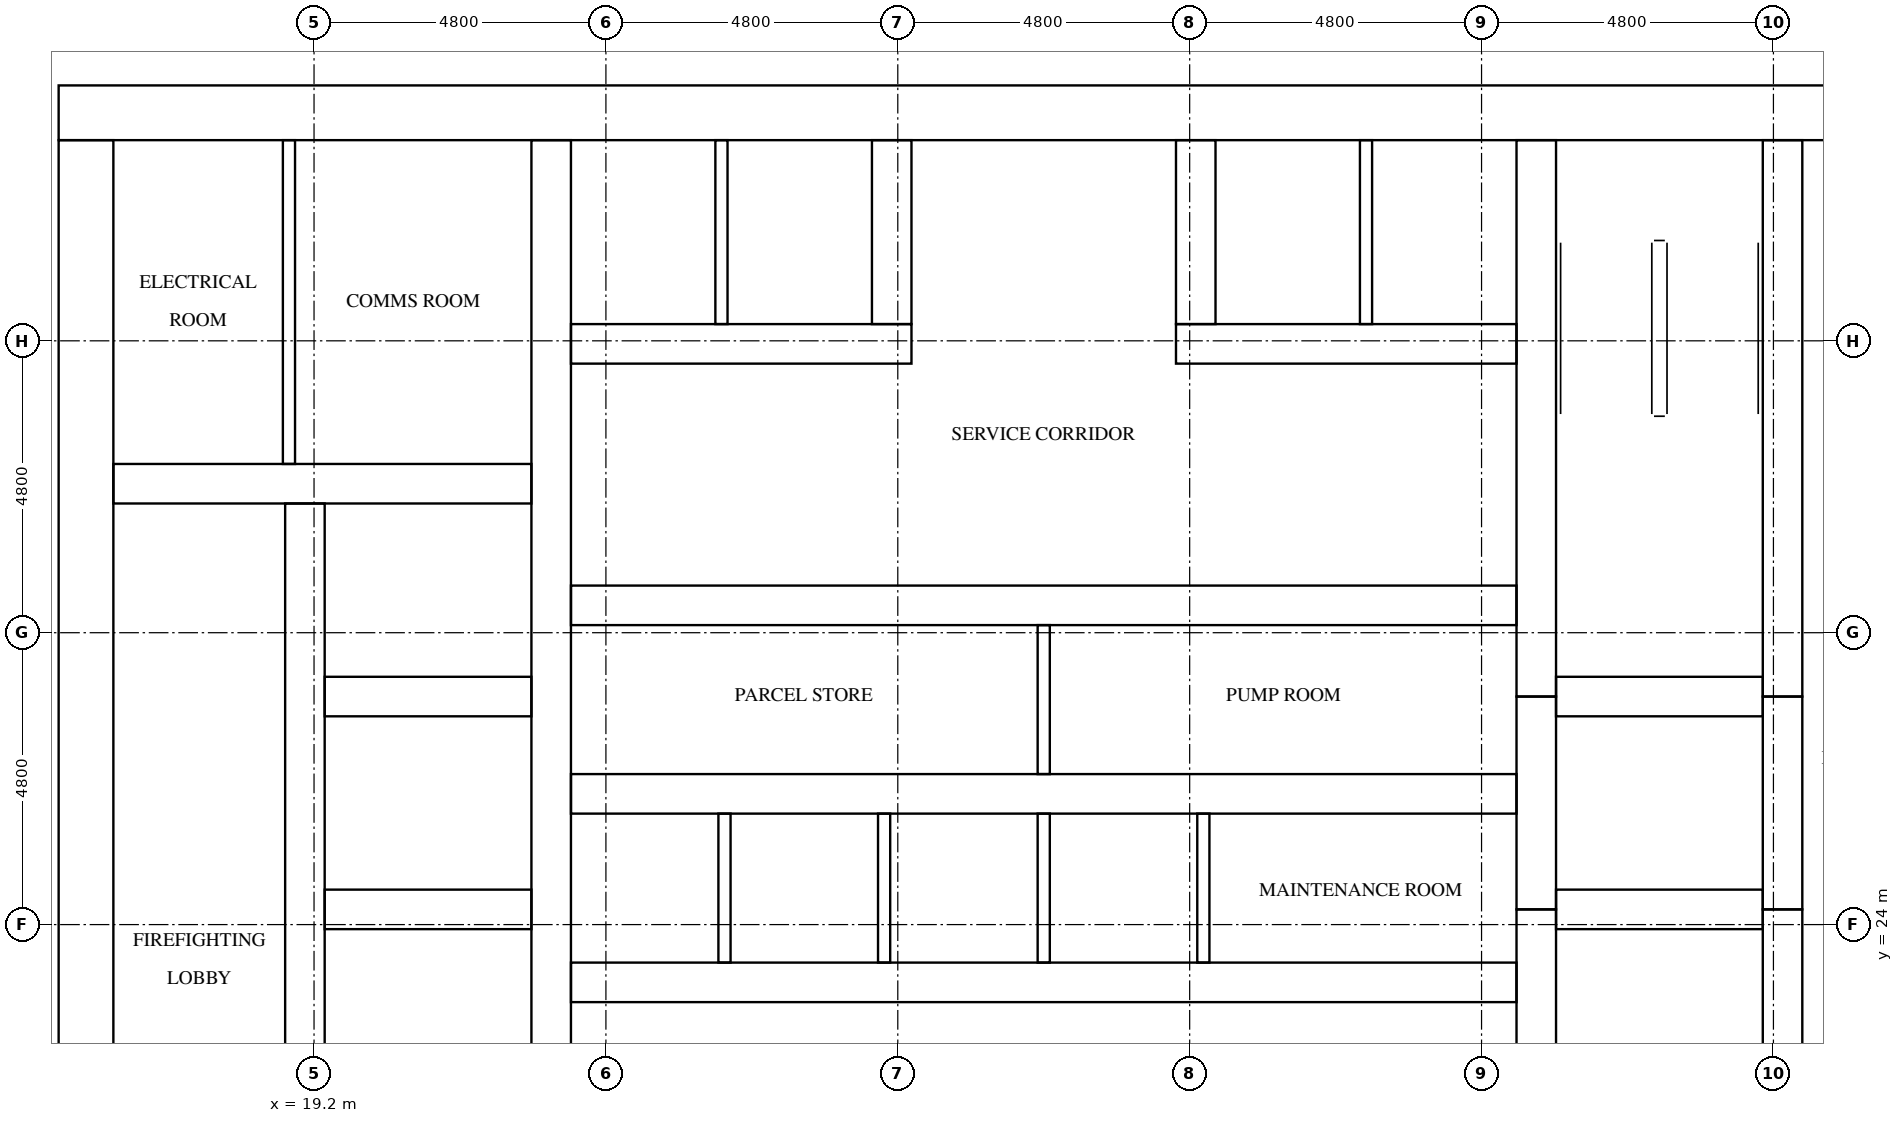
"""IFC4 building model, lengths in metres.
Left out: names, types, materials, properties, quantities, classifications, styles, units other than length and angle.
Written with IfcOpenShell. Run it as: python <this file> out.ifc"""

import sys

from ifc_helpers import new_model, si_unit, direction, frame, frame_2d, origin, place, context, subcontext, project, spatial, rectangle, extrude, element, fill, save


model = new_model("IFC4")
c1 = context("Model", 3, precision=1e-05, world=origin(), true_north=direction((0.0, 1.0)))
c2 = subcontext(c1, "Body", "Model", "MODEL_VIEW")
j1 = project(units=[si_unit("LENGTHUNIT", "METRE"), si_unit("PLANEANGLEUNIT", "RADIAN")], contexts=[c1])
p1 = place(None, origin())
s1 = spatial("IfcSite", under=j1, at=p1, CompositionType="ELEMENT")
p2 = place(p1, origin())
s2 = spatial("IfcBuilding", under=s1, at=p2, CompositionType="ELEMENT")
p3 = place(p2, frame((0.0, 0.0, 73.3)))
s3 = spatial("IfcBuildingStorey", under=s2, at=p3, CompositionType="ELEMENT", Elevation=73.3)
p4 = place(p3, frame((15.0, 37.35, 0.0), z_axis=(0.0, 0.0, 1.0), x_axis=(1.0, 0.0, 0.0)))
e1 = element("IfcWall", 1, at=p4, inside=s3, PredefinedType="SHEAR", context=c2, shape_type="SweptSolid", body=[
    extrude(rectangle(XDim=32.4, YDim=0.9, at=frame_2d((16.2, 0.0))), origin(), (0.0, 0.0, 1.0), 3.2),
])
p5 = place(p4, frame((15.3, 0.0, 0.0)))
e2 = element("IfcOpeningElement", 2, at=p5, cuts=e1, PredefinedType="OPENING", context=c2, shape_type="SweptSolid", body=[
    extrude(rectangle(XDim=1.8, YDim=2.1, at=frame_2d((0.9, 1.05))), frame((0.0, 0.46, 0.0), z_axis=(0.0, -1.0, 0.0), x_axis=(1.0, 0.0, 0.0)), (0.0, 0.0, 1.0), 0.92),
])
p6 = place(p4, frame((1.794, 0.0, 0.0)))
e3 = element("IfcOpeningElement", 3, at=p6, cuts=e1, PredefinedType="OPENING", context=c2, shape_type="SweptSolid", body=[
    extrude(rectangle(XDim=1.0, YDim=2.1, at=frame_2d((0.5, 1.05))), frame((0.0, 0.46, 0.0), z_axis=(0.0, -1.0, 0.0), x_axis=(1.0, 0.0, 0.0)), (0.0, 0.0, 1.0), 0.92),
])
p7 = place(p4, frame((5.331, 0.0, 0.0)))
e4 = element("IfcOpeningElement", 4, at=p7, cuts=e1, PredefinedType="OPENING", context=c2, shape_type="SweptSolid", body=[
    extrude(rectangle(XDim=1.0, YDim=2.1, at=frame_2d((0.5, 1.05))), frame((0.0, 0.46, 0.0), z_axis=(0.0, -1.0, 0.0), x_axis=(1.0, 0.0, 0.0)), (0.0, 0.0, 1.0), 0.92),
])
p8 = place(p3, frame((15.45, 15.9, 0.0), z_axis=(0.0, 0.0, 1.0), x_axis=(0.0, 1.0, 0.0)))
e5 = element("IfcWall", 5, at=p8, inside=s3, PredefinedType="SHEAR", context=c2, shape_type="SweptSolid", body=[
    extrude(rectangle(XDim=21.0, YDim=0.9, at=frame_2d((10.5, 0.0))), origin(), (0.0, 0.0, 1.0), 3.2),
])
p9 = place(p8, frame((4.86, 0.0, 0.0)))
e6 = element("IfcOpeningElement", 6, at=p9, cuts=e5, PredefinedType="OPENING", context=c2, shape_type="SweptSolid", body=[
    extrude(rectangle(XDim=1.2, YDim=2.1, at=frame_2d((0.6, 1.05))), frame((0.0, 0.46, 0.0), z_axis=(0.0, -1.0, 0.0), x_axis=(1.0, 0.0, 0.0)), (0.0, 0.0, 1.0), 0.92),
])
p10 = place(p3, frame((19.05, 15.9, 0.0), z_axis=(0.0, 0.0, 1.0), x_axis=(0.0, 1.0, 0.0)))
e7 = element("IfcWall", 7, at=p10, inside=s3, PredefinedType="SHEAR", context=c2, shape_type="SweptSolid", body=[
    extrude(rectangle(XDim=15.025, YDim=0.65, at=frame_2d((7.513, 0.0))), origin(), (0.0, 0.0, 1.0), 3.2),
])
p11 = place(p10, frame((9.55, 0.0, 0.0)))
e8 = element("IfcOpeningElement", 8, at=p11, cuts=e7, PredefinedType="OPENING", context=c2, shape_type="SweptSolid", body=[
    extrude(rectangle(XDim=1.1, YDim=2.1, at=frame_2d((0.55, 1.05))), frame((0.0, 0.335, 0.0), z_axis=(0.0, -1.0, 0.0), x_axis=(1.0, 0.0, 0.0)), (0.0, 0.0, 1.0), 0.67),
])
p12 = place(p10, frame((13.05, 0.0, 0.0)))
e9 = element("IfcOpeningElement", 9, at=p12, cuts=e7, PredefinedType="OPENING", context=c2, shape_type="SweptSolid", body=[
    extrude(rectangle(XDim=1.1, YDim=2.1, at=frame_2d((0.55, 1.05))), frame((0.0, 0.335, 0.0), z_axis=(0.0, -1.0, 0.0), x_axis=(1.0, 0.0, 0.0)), (0.0, 0.0, 1.0), 0.67),
])
p13 = place(p10, frame((0.3, 0.0, 0.0)))
e10 = element("IfcOpeningElement", 10, at=p13, cuts=e7, PredefinedType="OPENING", context=c2, shape_type="SweptSolid", body=[
    extrude(rectangle(XDim=1.2, YDim=2.1, at=frame_2d((0.6, 1.05))), frame((0.0, 0.335, 0.0), z_axis=(0.0, -1.0, 0.0), x_axis=(1.0, 0.0, 0.0)), (0.0, 0.0, 1.0), 0.67),
])
p14 = place(p3, frame((23.1, 15.9, 0.0), z_axis=(0.0, 0.0, 1.0), x_axis=(0.0, 1.0, 0.0)))
e11 = element("IfcWall", 11, at=p14, inside=s3, PredefinedType="SHEAR", context=c2, shape_type="SweptSolid", body=[
    extrude(rectangle(XDim=21.0, YDim=0.65, at=frame_2d((10.5, 0.0))), origin(), (0.0, 0.0, 1.0), 3.2),
])
p15 = place(p3, frame((39.3, 15.9, 0.0), z_axis=(0.0, 0.0, 1.0), x_axis=(0.0, 1.0, 0.0)))
e12 = element("IfcWall", 12, at=p15, inside=s3, PredefinedType="SHEAR", context=c2, shape_type="SweptSolid", body=[
    extrude(rectangle(XDim=8.35, YDim=0.65, at=frame_2d((4.175, 0.0))), origin(), (0.0, 0.0, 1.0), 3.2),
])
p16 = place(p3, frame((39.3, 24.25, 0.0), z_axis=(0.0, 0.0, 1.0), x_axis=(0.0, 1.0, 0.0)))
e13 = element("IfcWall", 13, at=p16, inside=s3, PredefinedType="SHEAR", context=c2, shape_type="SweptSolid", body=[
    extrude(rectangle(XDim=3.5, YDim=0.65, at=frame_2d((1.75, 0.0))), origin(), (0.0, 0.0, 1.0), 3.2),
])
p17 = place(p3, frame((39.3, 27.75, 0.0), z_axis=(0.0, 0.0, 1.0), x_axis=(0.0, 1.0, 0.0)))
e14 = element("IfcWall", 14, at=p17, inside=s3, PredefinedType="SHEAR", context=c2, shape_type="SweptSolid", body=[
    extrude(rectangle(XDim=9.15, YDim=0.65, at=frame_2d((4.575, 0.0))), origin(), (0.0, 0.0, 1.0), 3.2),
])
p18 = place(p3, frame((43.35, 15.9, 0.0), z_axis=(0.0, 0.0, 1.0), x_axis=(0.0, 1.0, 0.0)))
e15 = element("IfcWall", 15, at=p18, inside=s3, PredefinedType="SHEAR", context=c2, shape_type="SweptSolid", body=[
    extrude(rectangle(XDim=8.35, YDim=0.65, at=frame_2d((4.175, 0.0))), origin(), (0.0, 0.0, 1.0), 3.2),
])
p19 = place(p18, frame((0.3, 0.0, 0.0)))
e16 = element("IfcOpeningElement", 16, at=p19, cuts=e15, PredefinedType="OPENING", context=c2, shape_type="SweptSolid", body=[
    extrude(rectangle(XDim=1.2, YDim=2.1, at=frame_2d((0.6, 1.05))), frame((0.0, 0.335, 0.0), z_axis=(0.0, -1.0, 0.0), x_axis=(1.0, 0.0, 0.0)), (0.0, 0.0, 1.0), 0.67),
])
p20 = place(p3, frame((43.35, 24.25, 0.0), z_axis=(0.0, 0.0, 1.0), x_axis=(0.0, 1.0, 0.0)))
e17 = element("IfcWall", 17, at=p20, inside=s3, PredefinedType="SHEAR", context=c2, shape_type="SweptSolid", body=[
    extrude(rectangle(XDim=3.5, YDim=0.65, at=frame_2d((1.75, 0.0))), origin(), (0.0, 0.0, 1.0), 3.2),
])
p21 = place(p20, frame((1.2, 0.0, 0.0)))
e18 = element("IfcOpeningElement", 18, at=p21, cuts=e17, PredefinedType="OPENING", context=c2, shape_type="SweptSolid", body=[
    extrude(rectangle(XDim=1.1, YDim=2.1, at=frame_2d((0.55, 1.05))), frame((0.0, 0.335, 0.0), z_axis=(0.0, -1.0, 0.0), x_axis=(1.0, 0.0, 0.0)), (0.0, 0.0, 1.0), 0.67),
])
p22 = place(p3, frame((43.35, 27.75, 0.0), z_axis=(0.0, 0.0, 1.0), x_axis=(0.0, 1.0, 0.0)))
e19 = element("IfcWall", 19, at=p22, inside=s3, PredefinedType="SHEAR", context=c2, shape_type="SweptSolid", body=[
    extrude(rectangle(XDim=9.15, YDim=0.65, at=frame_2d((4.575, 0.0))), origin(), (0.0, 0.0, 1.0), 3.2),
])
p23 = place(p22, frame((7.65, 0.0, 0.0)))
e20 = element("IfcOpeningElement", 20, at=p23, cuts=e19, PredefinedType="OPENING", context=c2, shape_type="SweptSolid", body=[
    extrude(rectangle(XDim=1.2, YDim=2.1, at=frame_2d((0.6, 1.05))), frame((0.0, 0.335, 0.0), z_axis=(0.0, -1.0, 0.0), x_axis=(1.0, 0.0, 0.0)), (0.0, 0.0, 1.0), 0.67),
])
for number, where, z_axis, x_axis in (
    (21, (19.375, 24.25, 0.0), (0.0, 0.0, 1.0), (1.0, 0.0, 0.0)),
    (22, (19.375, 27.75, 0.0), (0.0, 0.0, 1.0), (1.0, 0.0, 0.0)),
):
    element("IfcWall", number, at=place(p3, frame(where, z_axis=z_axis, x_axis=x_axis)), inside=s3, PredefinedType="SHEAR", context=c2, shape_type="SweptSolid", body=[
        extrude(rectangle(XDim=3.4, YDim=0.65, at=frame_2d((1.7, 0.0))), origin(), (0.0, 0.0, 1.0), 3.2),
    ])
p24 = place(p3, frame((15.9, 31.25, 0.0), z_axis=(0.0, 0.0, 1.0), x_axis=(1.0, 0.0, 0.0)))
e23 = element("IfcWall", 23, at=p24, inside=s3, PredefinedType="SHEAR", context=c2, shape_type="SweptSolid", body=[
    extrude(rectangle(XDim=6.875, YDim=0.65, at=frame_2d((3.438, 0.0))), origin(), (0.0, 0.0, 1.0), 3.2),
])
for number, where, z_axis, x_axis in (
    (24, (39.625, 24.25, 0.0), (0.0, 0.0, 1.0), (1.0, 0.0, 0.0)),
    (25, (39.625, 27.75, 0.0), (0.0, 0.0, 1.0), (1.0, 0.0, 0.0)),
):
    element("IfcWall", number, at=place(p3, frame(where, z_axis=z_axis, x_axis=x_axis)), inside=s3, PredefinedType="SHEAR", context=c2, shape_type="SweptSolid", body=[
        extrude(rectangle(XDim=3.4, YDim=0.65, at=frame_2d((1.7, 0.0))), origin(), (0.0, 0.0, 1.0), 3.2),
    ])
p25 = place(p3, frame((23.425, 23.05, 0.0), z_axis=(0.0, 0.0, 1.0), x_axis=(1.0, 0.0, 0.0)))
e26 = element("IfcWall", 26, at=p25, inside=s3, PredefinedType="SHEAR", context=c2, shape_type="SweptSolid", body=[
    extrude(rectangle(XDim=15.55, YDim=0.65, at=frame_2d((7.775, 0.0))), origin(), (0.0, 0.0, 1.0), 3.2),
])
p26 = place(p25, frame((0.663, 0.0, 0.0)))
e27 = element("IfcOpeningElement", 27, at=p26, cuts=e26, PredefinedType="OPENING", context=c2, shape_type="SweptSolid", body=[
    extrude(rectangle(XDim=1.1, YDim=2.1, at=frame_2d((0.55, 1.05))), frame((0.0, 0.335, 0.0), z_axis=(0.0, -1.0, 0.0), x_axis=(1.0, 0.0, 0.0)), (0.0, 0.0, 1.0), 0.67),
])
p27 = place(p25, frame((3.288, 0.0, 0.0)))
e28 = element("IfcOpeningElement", 28, at=p27, cuts=e26, PredefinedType="OPENING", context=c2, shape_type="SweptSolid", body=[
    extrude(rectangle(XDim=1.1, YDim=2.1, at=frame_2d((0.55, 1.05))), frame((0.0, 0.335, 0.0), z_axis=(0.0, -1.0, 0.0), x_axis=(1.0, 0.0, 0.0)), (0.0, 0.0, 1.0), 0.67),
])
p28 = place(p25, frame((12.525, 0.0, 0.0)))
e29 = element("IfcOpeningElement", 29, at=p28, cuts=e26, PredefinedType="OPENING", context=c2, shape_type="SweptSolid", body=[
    extrude(rectangle(XDim=1.0, YDim=2.1, at=frame_2d((0.5, 1.05))), frame((0.0, 0.335, 0.0), z_axis=(0.0, -1.0, 0.0), x_axis=(1.0, 0.0, 0.0)), (0.0, 0.0, 1.0), 0.67),
])
p29 = place(p3, frame((23.425, 26.15, 0.0), z_axis=(0.0, 0.0, 1.0), x_axis=(1.0, 0.0, 0.0)))
e30 = element("IfcWall", 30, at=p29, inside=s3, PredefinedType="SHEAR", context=c2, shape_type="SweptSolid", body=[
    extrude(rectangle(XDim=15.55, YDim=0.65, at=frame_2d((7.775, 0.0))), origin(), (0.0, 0.0, 1.0), 3.2),
])
p30 = place(p3, frame((23.425, 29.25, 0.0), z_axis=(0.0, 0.0, 1.0), x_axis=(1.0, 0.0, 0.0)))
e31 = element("IfcWall", 31, at=p30, inside=s3, PredefinedType="SHEAR", context=c2, shape_type="SweptSolid", body=[
    extrude(rectangle(XDim=15.55, YDim=0.65, at=frame_2d((7.775, 0.0))), origin(), (0.0, 0.0, 1.0), 3.2),
])
p31 = place(p30, frame((3.337, 0.0, 0.0)))
e32 = element("IfcOpeningElement", 32, at=p31, cuts=e31, PredefinedType="OPENING", context=c2, shape_type="SweptSolid", body=[
    extrude(rectangle(XDim=1.0, YDim=2.1, at=frame_2d((0.5, 1.05))), frame((0.0, 0.335, 0.0), z_axis=(0.0, -1.0, 0.0), x_axis=(1.0, 0.0, 0.0)), (0.0, 0.0, 1.0), 0.67),
])
p32 = place(p30, frame((11.212, 0.0, 0.0)))
e33 = element("IfcOpeningElement", 33, at=p32, cuts=e31, PredefinedType="OPENING", context=c2, shape_type="SweptSolid", body=[
    extrude(rectangle(XDim=1.0, YDim=2.1, at=frame_2d((0.5, 1.05))), frame((0.0, 0.335, 0.0), z_axis=(0.0, -1.0, 0.0), x_axis=(1.0, 0.0, 0.0)), (0.0, 0.0, 1.0), 0.67),
])
p33 = place(p3, frame((23.425, 33.55, 0.0), z_axis=(0.0, 0.0, 1.0), x_axis=(1.0, 0.0, 0.0)))
e34 = element("IfcWall", 34, at=p33, inside=s3, PredefinedType="SHEAR", context=c2, shape_type="SweptSolid", body=[
    extrude(rectangle(XDim=5.6, YDim=0.65, at=frame_2d((2.8, 0.0))), origin(), (0.0, 0.0, 1.0), 3.2),
])
p34 = place(p3, frame((33.375, 33.55, 0.0), z_axis=(0.0, 0.0, 1.0), x_axis=(1.0, 0.0, 0.0)))
e35 = element("IfcWall", 35, at=p34, inside=s3, PredefinedType="SHEAR", context=c2, shape_type="SweptSolid", body=[
    extrude(rectangle(XDim=5.6, YDim=0.65, at=frame_2d((2.8, 0.0))), origin(), (0.0, 0.0, 1.0), 3.2),
])
for number, where, z_axis, x_axis in (
    (36, (28.7, 33.875, 0.0), (0.0, 0.0, 1.0), (0.0, 1.0, 0.0)),
    (37, (33.7, 33.875, 0.0), (0.0, 0.0, 1.0), (0.0, 1.0, 0.0)),
):
    element("IfcWall", number, at=place(p3, frame(where, z_axis=z_axis, x_axis=x_axis)), inside=s3, PredefinedType="SHEAR", context=c2, shape_type="SweptSolid", body=[
        extrude(rectangle(XDim=3.025, YDim=0.65, at=frame_2d((1.512, 0.0))), origin(), (0.0, 0.0, 1.0), 3.2),
    ])
for number, where, z_axis, x_axis in (
    (38, (25.95, 23.375, 0.0), (0.0, 0.0, 1.0), (0.0, 1.0, 0.0)),
    (39, (28.575, 23.375, 0.0), (0.0, 0.0, 1.0), (0.0, 1.0, 0.0)),
    (40, (31.2, 23.375, 0.0), (0.0, 0.0, 1.0), (0.0, 1.0, 0.0)),
    (41, (33.825, 23.375, 0.0), (0.0, 0.0, 1.0), (0.0, 1.0, 0.0)),
):
    element("IfcWall", number, at=place(p3, frame(where, z_axis=z_axis, x_axis=x_axis)), inside=s3, PredefinedType="SOLIDWALL", context=c2, shape_type="SweptSolid", body=[
        extrude(rectangle(XDim=2.45, YDim=0.2, at=frame_2d((1.225, 0.0))), origin(), (0.0, 0.0, 1.0), 3.2),
    ])
for number, where, z_axis, x_axis in (
    (42, (25.9, 33.875, 0.0), (0.0, 0.0, 1.0), (0.0, 1.0, 0.0)),
    (43, (36.5, 33.875, 0.0), (0.0, 0.0, 1.0), (0.0, 1.0, 0.0)),
):
    element("IfcWall", number, at=place(p3, frame(where, z_axis=z_axis, x_axis=x_axis)), inside=s3, PredefinedType="SOLIDWALL", context=c2, shape_type="SweptSolid", body=[
        extrude(rectangle(XDim=3.025, YDim=0.2, at=frame_2d((1.512, 0.0))), origin(), (0.0, 0.0, 1.0), 3.2),
    ])
p35 = place(p3, frame((18.788, 31.575, 0.0), z_axis=(0.0, 0.0, 1.0), x_axis=(0.0, 1.0, 0.0)))
e44 = element("IfcWall", 44, at=p35, inside=s3, PredefinedType="PARTITIONING", context=c2, shape_type="SweptSolid", body=[
    extrude(rectangle(XDim=5.325, YDim=0.2, at=frame_2d((2.663, 0.0))), origin(), (0.0, 0.0, 1.0), 3.2),
])
p36 = place(p3, frame((31.2, 26.475, 0.0), z_axis=(0.0, 0.0, 1.0), x_axis=(0.0, 1.0, 0.0)))
e45 = element("IfcWall", 45, at=p36, inside=s3, PredefinedType="PARTITIONING", context=c2, shape_type="SweptSolid", body=[
    extrude(rectangle(XDim=2.45, YDim=0.2, at=frame_2d((1.225, 0.0))), origin(), (0.0, 0.0, 1.0), 3.2),
])
p37 = place(p26, origin())
e46 = element("IfcDoor", 46, at=p37, inside=s3, OperationType="DOUBLE_DOOR_SLIDING", PredefinedType="DOOR", context=c2, shape_type="SweptSolid", body=[
    extrude(rectangle(XDim=1.1, YDim=2.1, at=frame_2d((0.55, 1.05))), frame((0.0, 0.025, 0.0), z_axis=(0.0, -1.0, 0.0), x_axis=(1.0, 0.0, 0.0)), (0.0, 0.0, 1.0), 0.05),
])
fill(e27, e46)
p38 = place(p27, origin())
e47 = element("IfcDoor", 47, at=p38, inside=s3, OperationType="DOUBLE_DOOR_SLIDING", PredefinedType="DOOR", context=c2, shape_type="SweptSolid", body=[
    extrude(rectangle(XDim=1.1, YDim=2.1, at=frame_2d((0.55, 1.05))), frame((0.0, 0.025, 0.0), z_axis=(0.0, -1.0, 0.0), x_axis=(1.0, 0.0, 0.0)), (0.0, 0.0, 1.0), 0.05),
])
fill(e28, e47)
p39 = place(p11, origin())
e48 = element("IfcDoor", 48, at=p39, inside=s3, OperationType="DOUBLE_DOOR_SLIDING", PredefinedType="DOOR", context=c2, shape_type="SweptSolid", body=[
    extrude(rectangle(XDim=1.1, YDim=2.1, at=frame_2d((0.55, 1.05))), frame((0.0, 0.025, 0.0), z_axis=(0.0, -1.0, 0.0), x_axis=(1.0, 0.0, 0.0)), (0.0, 0.0, 1.0), 0.05),
])
fill(e8, e48)
p40 = place(p12, origin())
e49 = element("IfcDoor", 49, at=p40, inside=s3, OperationType="DOUBLE_DOOR_SLIDING", PredefinedType="DOOR", context=c2, shape_type="SweptSolid", body=[
    extrude(rectangle(XDim=1.1, YDim=2.1, at=frame_2d((0.55, 1.05))), frame((0.0, 0.025, 0.0), z_axis=(0.0, -1.0, 0.0), x_axis=(1.0, 0.0, 0.0)), (0.0, 0.0, 1.0), 0.05),
])
fill(e9, e49)
p41 = place(p21, origin())
e50 = element("IfcDoor", 50, at=p41, inside=s3, OperationType="DOUBLE_DOOR_SLIDING", PredefinedType="DOOR", context=c2, shape_type="SweptSolid", body=[
    extrude(rectangle(XDim=1.1, YDim=2.1, at=frame_2d((0.55, 1.05))), frame((0.0, 0.025, 0.0), z_axis=(0.0, -1.0, 0.0), x_axis=(1.0, 0.0, 0.0)), (0.0, 0.0, 1.0), 0.05),
])
fill(e18, e50)
p42 = place(p23, origin())
e51 = element("IfcDoor", 51, at=p42, inside=s3, OperationType="SINGLE_SWING_RIGHT", PredefinedType="DOOR", context=c2, shape_type="SweptSolid", body=[
    extrude(rectangle(XDim=1.2, YDim=2.1, at=frame_2d((0.6, 1.05))), frame((0.0, 0.025, 0.0), z_axis=(0.0, -1.0, 0.0), x_axis=(1.0, 0.0, 0.0)), (0.0, 0.0, 1.0), 0.05),
])
fill(e20, e51)
p43 = place(p5, origin())
e52 = element("IfcDoor", 52, at=p43, inside=s3, OperationType="DOUBLE_DOOR_SINGLE_SWING", PredefinedType="DOOR", context=c2, shape_type="SweptSolid", body=[
    extrude(rectangle(XDim=1.8, YDim=2.1, at=frame_2d((0.9, 1.05))), frame((0.0, 0.025, 0.0), z_axis=(0.0, -1.0, 0.0), x_axis=(1.0, 0.0, 0.0)), (0.0, 0.0, 1.0), 0.05),
])
fill(e2, e52)
p44 = place(p6, origin())
e53 = element("IfcDoor", 53, at=p44, inside=s3, OperationType="SINGLE_SWING_LEFT", PredefinedType="DOOR", context=c2, shape_type="SweptSolid", body=[
    extrude(rectangle(XDim=1.0, YDim=2.1, at=frame_2d((0.5, 1.05))), frame((0.0, 0.025, 0.0), z_axis=(0.0, -1.0, 0.0), x_axis=(1.0, 0.0, 0.0)), (0.0, 0.0, 1.0), 0.05),
])
fill(e3, e53)
p45 = place(p7, origin())
e54 = element("IfcDoor", 54, at=p45, inside=s3, OperationType="SINGLE_SWING_RIGHT", PredefinedType="DOOR", context=c2, shape_type="SweptSolid", body=[
    extrude(rectangle(XDim=1.0, YDim=2.1, at=frame_2d((0.5, 1.05))), frame((0.0, 0.025, 0.0), z_axis=(0.0, -1.0, 0.0), x_axis=(1.0, 0.0, 0.0)), (0.0, 0.0, 1.0), 0.05),
])
fill(e4, e54)
p46 = place(p28, frame((1.0, 0.0, 0.0), z_axis=(0.0, 0.0, 1.0), x_axis=(-1.0, 0.0, 0.0)))
e55 = element("IfcDoor", 55, at=p46, inside=s3, OperationType="SINGLE_SWING_LEFT", PredefinedType="DOOR", context=c2, shape_type="SweptSolid", body=[
    extrude(rectangle(XDim=1.0, YDim=2.1, at=frame_2d((0.5, 1.05))), frame((0.0, 0.025, 0.0), z_axis=(0.0, -1.0, 0.0), x_axis=(1.0, 0.0, 0.0)), (0.0, 0.0, 1.0), 0.05),
])
fill(e29, e55)
p47 = place(p31, origin())
e56 = element("IfcDoor", 56, at=p47, inside=s3, OperationType="SINGLE_SWING_RIGHT", PredefinedType="DOOR", context=c2, shape_type="SweptSolid", body=[
    extrude(rectangle(XDim=1.0, YDim=2.1, at=frame_2d((0.5, 1.05))), frame((0.0, 0.025, 0.0), z_axis=(0.0, -1.0, 0.0), x_axis=(1.0, 0.0, 0.0)), (0.0, 0.0, 1.0), 0.05),
])
fill(e32, e56)
p48 = place(p32, origin())
e57 = element("IfcDoor", 57, at=p48, inside=s3, OperationType="SINGLE_SWING_LEFT", PredefinedType="DOOR", context=c2, shape_type="SweptSolid", body=[
    extrude(rectangle(XDim=1.0, YDim=2.1, at=frame_2d((0.5, 1.05))), frame((0.0, 0.025, 0.0), z_axis=(0.0, -1.0, 0.0), x_axis=(1.0, 0.0, 0.0)), (0.0, 0.0, 1.0), 0.05),
])
fill(e33, e57)
save(model, sys.argv[1])
